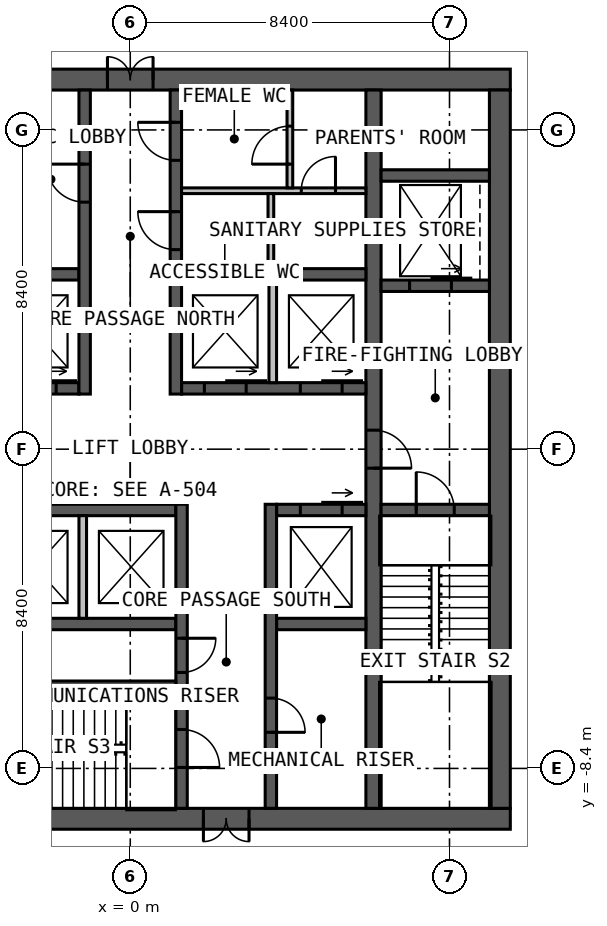
"""IFC4 building model, lengths in metres.
Left out: names, types, materials, properties, quantities, classifications, styles, units other than length and angle.
Written with IfcOpenShell. Run it as: python <this file> out.ifc"""

import sys

from ifc_helpers import new_model, si_unit, direction, frame, frame_2d, origin, place, context, subcontext, project, spatial, rectangle, extrude, element, fill, save


model = new_model("IFC4")
c1 = context("Model", 3, precision=1e-05, world=origin(), true_north=direction((0.0, 1.0)))
c2 = subcontext(c1, "Body", "Model", "MODEL_VIEW")
j1 = project(units=[si_unit("LENGTHUNIT", "METRE"), si_unit("PLANEANGLEUNIT", "RADIAN")], contexts=[c1])
p1 = place(None, origin())
s1 = spatial("IfcSite", under=j1, at=p1, CompositionType="ELEMENT")
p2 = place(p1, origin())
s2 = spatial("IfcBuilding", under=s1, at=p2, CompositionType="ELEMENT")
p3 = place(p2, frame((0.0, 0.0, 130.0)))
s3 = spatial("IfcBuildingStorey", under=s2, at=p3, CompositionType="ELEMENT", Elevation=130.0)
p4 = place(p3, frame((-10.0, 9.725, 0.0), z_axis=(0.0, 0.0, 1.0), x_axis=(1.0, 0.0, 0.0)))
e1 = element("IfcWall", 1, at=p4, inside=s3, PredefinedType="SOLIDWALL", context=c2, shape_type="SweptSolid", body=[
    extrude(rectangle(XDim=20.0, YDim=0.55, at=frame_2d((10.0, 0.0))), origin(), (0.0, 0.0, 1.0), 4.0),
])
p5 = place(p4, frame((9.4, 0.0, 0.0)))
e2 = element("IfcOpeningElement", 2, at=p5, cuts=e1, PredefinedType="OPENING", context=c2, shape_type="SweptSolid", body=[
    extrude(rectangle(XDim=1.2, YDim=2.2, at=frame_2d((0.6, 1.1))), frame((0.0, 0.285, 0.0), z_axis=(0.0, -1.0, 0.0), x_axis=(1.0, 0.0, 0.0)), (0.0, 0.0, 1.0), 0.57),
])
p6 = place(p3, frame((10.0, -9.725, 0.0), z_axis=(0.0, 0.0, 1.0), x_axis=(-1.0, 0.0, 0.0)))
e3 = element("IfcWall", 3, at=p6, inside=s3, PredefinedType="SOLIDWALL", context=c2, shape_type="SweptSolid", body=[
    extrude(rectangle(XDim=20.0, YDim=0.55, at=frame_2d((10.0, 0.0))), origin(), (0.0, 0.0, 1.0), 4.0),
])
p7 = place(p6, frame((6.875, 0.0, 0.0)))
e4 = element("IfcOpeningElement", 4, at=p7, cuts=e3, PredefinedType="OPENING", context=c2, shape_type="SweptSolid", body=[
    extrude(rectangle(XDim=1.2, YDim=2.2, at=frame_2d((0.6, 1.1))), frame((0.0, 0.285, 0.0), z_axis=(0.0, -1.0, 0.0), x_axis=(1.0, 0.0, 0.0)), (0.0, 0.0, 1.0), 0.57),
])
p8 = place(p3, frame((9.725, -9.45, 0.0), z_axis=(0.0, 0.0, 1.0), x_axis=(0.0, 1.0, 0.0)))
e5 = element("IfcWall", 5, at=p8, inside=s3, PredefinedType="SOLIDWALL", context=c2, shape_type="SweptSolid", body=[
    extrude(rectangle(XDim=18.9, YDim=0.55, at=frame_2d((9.45, 0.0))), origin(), (0.0, 0.0, 1.0), 4.0),
])
p9 = place(p3, frame((6.4, 9.45, 0.0), z_axis=(0.0, 0.0, 1.0), x_axis=(0.0, -1.0, 0.0)))
e6 = element("IfcWall", 6, at=p9, inside=s3, PredefinedType="SOLIDWALL", context=c2, shape_type="SweptSolid", body=[
    extrude(rectangle(XDim=18.9, YDim=0.4, at=frame_2d((9.45, 0.0))), origin(), (0.0, 0.0, 1.0), 4.0),
])
p10 = place(p9, frame((8.95, 0.0, 0.0)))
e7 = element("IfcOpeningElement", 7, at=p10, cuts=e6, PredefinedType="OPENING", context=c2, shape_type="SweptSolid", body=[
    extrude(rectangle(XDim=1.0, YDim=2.2, at=frame_2d((0.5, 1.1))), frame((0.0, 0.21, 0.0), z_axis=(0.0, -1.0, 0.0), x_axis=(1.0, 0.0, 0.0)), (0.0, 0.0, 1.0), 0.42),
])
p11 = place(p3, frame((-6.2, 1.6, 0.0), z_axis=(0.0, 0.0, 1.0), x_axis=(1.0, 0.0, 0.0)))
e8 = element("IfcWall", 8, at=p11, inside=s3, PredefinedType="SOLIDWALL", context=c2, shape_type="SweptSolid", body=[
    extrude(rectangle(XDim=4.85, YDim=0.3, at=frame_2d((2.425, 0.0))), origin(), (0.0, 0.0, 1.0), 4.0),
])
p12 = place(p11, frame((0.625, 0.0, 0.0)))
e9 = element("IfcOpeningElement", 9, at=p12, cuts=e8, PredefinedType="OPENING", context=c2, shape_type="SweptSolid", body=[
    extrude(rectangle(XDim=1.1, YDim=2.2, at=frame_2d((0.55, 1.1))), frame((0.0, 0.16, 0.0), z_axis=(0.0, -1.0, 0.0), x_axis=(1.0, 0.0, 0.0)), (0.0, 0.0, 1.0), 0.32),
])
p13 = place(p11, frame((3.15, 0.0, 0.0)))
e10 = element("IfcOpeningElement", 10, at=p13, cuts=e8, PredefinedType="OPENING", context=c2, shape_type="SweptSolid", body=[
    extrude(rectangle(XDim=1.1, YDim=2.2, at=frame_2d((0.55, 1.1))), frame((0.0, 0.16, 0.0), z_axis=(0.0, -1.0, 0.0), x_axis=(1.0, 0.0, 0.0)), (0.0, 0.0, 1.0), 0.32),
])
p14 = place(p3, frame((1.35, 1.6, 0.0), z_axis=(0.0, 0.0, 1.0), x_axis=(1.0, 0.0, 0.0)))
e11 = element("IfcWall", 11, at=p14, inside=s3, PredefinedType="SOLIDWALL", context=c2, shape_type="SweptSolid", body=[
    extrude(rectangle(XDim=4.85, YDim=0.3, at=frame_2d((2.425, 0.0))), origin(), (0.0, 0.0, 1.0), 4.0),
])
p15 = place(p14, frame((0.6, 0.0, 0.0)))
e12 = element("IfcOpeningElement", 12, at=p15, cuts=e11, PredefinedType="OPENING", context=c2, shape_type="SweptSolid", body=[
    extrude(rectangle(XDim=1.1, YDim=2.2, at=frame_2d((0.55, 1.1))), frame((0.0, 0.16, 0.0), z_axis=(0.0, -1.0, 0.0), x_axis=(1.0, 0.0, 0.0)), (0.0, 0.0, 1.0), 0.32),
])
p16 = place(p14, frame((3.125, 0.0, 0.0)))
e13 = element("IfcOpeningElement", 13, at=p16, cuts=e11, PredefinedType="OPENING", context=c2, shape_type="SweptSolid", body=[
    extrude(rectangle(XDim=1.1, YDim=2.2, at=frame_2d((0.55, 1.1))), frame((0.0, 0.16, 0.0), z_axis=(0.0, -1.0, 0.0), x_axis=(1.0, 0.0, 0.0)), (0.0, 0.0, 1.0), 0.32),
])
for number, where, z_axis, x_axis in (
    (14, (-6.2, 4.6, 0.0), (0.0, 0.0, 1.0), (1.0, 0.0, 0.0)),
    (15, (1.35, 4.6, 0.0), (0.0, 0.0, 1.0), (1.0, 0.0, 0.0)),
):
    element("IfcWall", number, at=place(p3, frame(where, z_axis=z_axis, x_axis=x_axis)), inside=s3, PredefinedType="SOLIDWALL", context=c2, shape_type="SweptSolid", body=[
        extrude(rectangle(XDim=4.85, YDim=0.3, at=frame_2d((2.425, 0.0))), origin(), (0.0, 0.0, 1.0), 4.0),
    ])
p17 = place(p3, frame((-1.2, 1.45, 0.0), z_axis=(0.0, 0.0, 1.0), x_axis=(0.0, 1.0, 0.0)))
e16 = element("IfcWall", 16, at=p17, inside=s3, PredefinedType="SOLIDWALL", context=c2, shape_type="SweptSolid", body=[
    extrude(rectangle(XDim=8.0, YDim=0.3, at=frame_2d((4.0, 0.0))), origin(), (0.0, 0.0, 1.0), 4.0),
])
p18 = place(p17, frame((5.05, 0.0, 0.0)))
e17 = element("IfcOpeningElement", 17, at=p18, cuts=e16, PredefinedType="OPENING", context=c2, shape_type="SweptSolid", body=[
    extrude(rectangle(XDim=1.0, YDim=2.2, at=frame_2d((0.5, 1.1))), frame((0.0, 0.16, 0.0), z_axis=(0.0, -1.0, 0.0), x_axis=(1.0, 0.0, 0.0)), (0.0, 0.0, 1.0), 0.32),
])
p19 = place(p3, frame((1.2, 1.45, 0.0), z_axis=(0.0, 0.0, 1.0), x_axis=(0.0, 1.0, 0.0)))
e18 = element("IfcWall", 18, at=p19, inside=s3, PredefinedType="SOLIDWALL", context=c2, shape_type="SweptSolid", body=[
    extrude(rectangle(XDim=8.0, YDim=0.3, at=frame_2d((4.0, 0.0))), origin(), (0.0, 0.0, 1.0), 4.0),
])
p20 = place(p19, frame((3.8, 0.0, 0.0)))
e19 = element("IfcOpeningElement", 19, at=p20, cuts=e18, PredefinedType="OPENING", context=c2, shape_type="SweptSolid", body=[
    extrude(rectangle(XDim=1.0, YDim=2.2, at=frame_2d((0.5, 1.1))), frame((0.0, 0.16, 0.0), z_axis=(0.0, -1.0, 0.0), x_axis=(1.0, 0.0, 0.0)), (0.0, 0.0, 1.0), 0.32),
])
p21 = place(p19, frame((6.15, 0.0, 0.0)))
e20 = element("IfcOpeningElement", 20, at=p21, cuts=e18, PredefinedType="OPENING", context=c2, shape_type="SweptSolid", body=[
    extrude(rectangle(XDim=1.0, YDim=2.2, at=frame_2d((0.5, 1.1))), frame((0.0, 0.16, 0.0), z_axis=(0.0, -1.0, 0.0), x_axis=(1.0, 0.0, 0.0)), (0.0, 0.0, 1.0), 0.32),
])
p22 = place(p3, frame((-6.2, -1.6, 0.0), z_axis=(0.0, 0.0, 1.0), x_axis=(1.0, 0.0, 0.0)))
e21 = element("IfcWall", 21, at=p22, inside=s3, PredefinedType="SOLIDWALL", context=c2, shape_type="SweptSolid", body=[
    extrude(rectangle(XDim=7.4, YDim=0.3, at=frame_2d((3.7, 0.0))), origin(), (0.0, 0.0, 1.0), 4.0),
])
p23 = place(p3, frame((3.85, -1.6, 0.0), z_axis=(0.0, 0.0, 1.0), x_axis=(1.0, 0.0, 0.0)))
e22 = element("IfcWall", 22, at=p23, inside=s3, PredefinedType="SOLIDWALL", context=c2, shape_type="SweptSolid", body=[
    extrude(rectangle(XDim=2.35, YDim=0.3, at=frame_2d((1.175, 0.0))), origin(), (0.0, 0.0, 1.0), 4.0),
])
p24 = place(p23, frame((0.625, 0.0, 0.0)))
e23 = element("IfcOpeningElement", 23, at=p24, cuts=e22, PredefinedType="OPENING", context=c2, shape_type="SweptSolid", body=[
    extrude(rectangle(XDim=1.1, YDim=2.2, at=frame_2d((0.55, 1.1))), frame((0.0, 0.16, 0.0), z_axis=(0.0, -1.0, 0.0), x_axis=(1.0, 0.0, 0.0)), (0.0, 0.0, 1.0), 0.32),
])
p25 = place(p3, frame((-6.2, -4.6, 0.0), z_axis=(0.0, 0.0, 1.0), x_axis=(1.0, 0.0, 0.0)))
e24 = element("IfcWall", 24, at=p25, inside=s3, PredefinedType="SOLIDWALL", context=c2, shape_type="SweptSolid", body=[
    extrude(rectangle(XDim=7.4, YDim=0.3, at=frame_2d((3.7, 0.0))), origin(), (0.0, 0.0, 1.0), 4.0),
])
p26 = place(p3, frame((3.85, -4.6, 0.0), z_axis=(0.0, 0.0, 1.0), x_axis=(1.0, 0.0, 0.0)))
e25 = element("IfcWall", 25, at=p26, inside=s3, PredefinedType="SOLIDWALL", context=c2, shape_type="SweptSolid", body=[
    extrude(rectangle(XDim=2.35, YDim=0.3, at=frame_2d((1.175, 0.0))), origin(), (0.0, 0.0, 1.0), 4.0),
])
p27 = place(p3, frame((1.35, -1.45, 0.0), z_axis=(0.0, 0.0, 1.0), x_axis=(0.0, -1.0, 0.0)))
e26 = element("IfcWall", 26, at=p27, inside=s3, PredefinedType="SOLIDWALL", context=c2, shape_type="SweptSolid", body=[
    extrude(rectangle(XDim=8.0, YDim=0.3, at=frame_2d((4.0, 0.0))), origin(), (0.0, 0.0, 1.0), 4.0),
])
p28 = place(p27, frame((5.925, 0.0, 0.0)))
e27 = element("IfcOpeningElement", 27, at=p28, cuts=e26, PredefinedType="OPENING", context=c2, shape_type="SweptSolid", body=[
    extrude(rectangle(XDim=1.0, YDim=2.2, at=frame_2d((0.5, 1.1))), frame((0.0, 0.16, 0.0), z_axis=(0.0, -1.0, 0.0), x_axis=(1.0, 0.0, 0.0)), (0.0, 0.0, 1.0), 0.32),
])
p29 = place(p27, frame((3.525, 0.0, 0.0)))
e28 = element("IfcOpeningElement", 28, at=p29, cuts=e26, PredefinedType="OPENING", context=c2, shape_type="SweptSolid", body=[
    extrude(rectangle(XDim=0.9, YDim=2.2, at=frame_2d((0.45, 1.1))), frame((0.0, 0.16, 0.0), z_axis=(0.0, -1.0, 0.0), x_axis=(1.0, 0.0, 0.0)), (0.0, 0.0, 1.0), 0.32),
])
p30 = place(p3, frame((3.7, -1.45, 0.0), z_axis=(0.0, 0.0, 1.0), x_axis=(0.0, -1.0, 0.0)))
e29 = element("IfcWall", 29, at=p30, inside=s3, PredefinedType="SOLIDWALL", context=c2, shape_type="SweptSolid", body=[
    extrude(rectangle(XDim=8.0, YDim=0.3, at=frame_2d((4.0, 0.0))), origin(), (0.0, 0.0, 1.0), 4.0),
])
p31 = place(p30, frame((5.1, 0.0, 0.0)))
e30 = element("IfcOpeningElement", 30, at=p31, cuts=e29, PredefinedType="OPENING", context=c2, shape_type="SweptSolid", body=[
    extrude(rectangle(XDim=0.9, YDim=2.2, at=frame_2d((0.45, 1.1))), frame((0.0, 0.16, 0.0), z_axis=(0.0, -1.0, 0.0), x_axis=(1.0, 0.0, 0.0)), (0.0, 0.0, 1.0), 0.32),
])
p32 = place(p3, frame((-6.2, -6.2, 0.0), z_axis=(0.0, 0.0, 1.0), x_axis=(1.0, 0.0, 0.0)))
e31 = element("IfcWall", 31, at=p32, inside=s3, PredefinedType="SOLIDWALL", context=c2, shape_type="SweptSolid", body=[
    extrude(rectangle(XDim=7.4, YDim=0.2, at=frame_2d((3.7, 0.0))), origin(), (0.0, 0.0, 1.0), 4.0),
])
p33 = place(p3, frame((6.6, -1.6, 0.0), z_axis=(0.0, 0.0, 1.0), x_axis=(1.0, 0.0, 0.0)))
e32 = element("IfcWall", 32, at=p33, inside=s3, PredefinedType="SOLIDWALL", context=c2, shape_type="SweptSolid", body=[
    extrude(rectangle(XDim=2.85, YDim=0.3, at=frame_2d((1.425, 0.0))), origin(), (0.0, 0.0, 1.0), 4.0),
])
p34 = place(p33, frame((0.925, 0.0, 0.0)))
e33 = element("IfcOpeningElement", 33, at=p34, cuts=e32, PredefinedType="OPENING", context=c2, shape_type="SweptSolid", body=[
    extrude(rectangle(XDim=1.0, YDim=2.2, at=frame_2d((0.5, 1.1))), frame((0.0, 0.16, 0.0), z_axis=(0.0, -1.0, 0.0), x_axis=(1.0, 0.0, 0.0)), (0.0, 0.0, 1.0), 0.32),
])
p35 = place(p3, frame((6.6, 4.3, 0.0), z_axis=(0.0, 0.0, 1.0), x_axis=(1.0, 0.0, 0.0)))
e34 = element("IfcWall", 34, at=p35, inside=s3, PredefinedType="SOLIDWALL", context=c2, shape_type="SweptSolid", body=[
    extrude(rectangle(XDim=2.85, YDim=0.3, at=frame_2d((1.425, 0.0))), origin(), (0.0, 0.0, 1.0), 4.0),
])
p36 = place(p35, frame((0.75, 0.0, 0.0)))
e35 = element("IfcOpeningElement", 35, at=p36, cuts=e34, PredefinedType="OPENING", context=c2, shape_type="SweptSolid", body=[
    extrude(rectangle(XDim=1.1, YDim=2.2, at=frame_2d((0.55, 1.1))), frame((0.0, 0.16, 0.0), z_axis=(0.0, -1.0, 0.0), x_axis=(1.0, 0.0, 0.0)), (0.0, 0.0, 1.0), 0.32),
])
p37 = place(p3, frame((6.6, 7.2, 0.0), z_axis=(0.0, 0.0, 1.0), x_axis=(1.0, 0.0, 0.0)))
e36 = element("IfcWall", 36, at=p37, inside=s3, PredefinedType="SOLIDWALL", context=c2, shape_type="SweptSolid", body=[
    extrude(rectangle(XDim=2.85, YDim=0.3, at=frame_2d((1.425, 0.0))), origin(), (0.0, 0.0, 1.0), 4.0),
])
for number, where, z_axis, x_axis in (
    (37, (3.75, 1.75, 0.0), (0.0, 0.0, 1.0), (0.0, 1.0, 0.0)),
    (38, (-1.25, -1.75, 0.0), (0.0, 0.0, 1.0), (0.0, -1.0, 0.0)),
):
    element("IfcWall", number, at=place(p3, frame(where, z_axis=z_axis, x_axis=x_axis)), inside=s3, PredefinedType="SOLIDWALL", context=c2, shape_type="SweptSolid", body=[
        extrude(rectangle(XDim=2.7, YDim=0.2, at=frame_2d((1.35, 0.0))), origin(), (0.0, 0.0, 1.0), 3.75),
    ])
p38 = place(p3, frame((1.35, 6.8, 0.0), z_axis=(0.0, 0.0, 1.0), x_axis=(1.0, 0.0, 0.0)))
e39 = element("IfcWall", 39, at=p38, inside=s3, PredefinedType="PARTITIONING", context=c2, shape_type="SweptSolid", body=[
    extrude(rectangle(XDim=4.85, YDim=0.15, at=frame_2d((2.425, 0.0))), origin(), (0.0, 0.0, 1.0), 3.75),
])
p39 = place(p38, frame((3.15, 0.0, 0.0)))
e40 = element("IfcOpeningElement", 40, at=p39, cuts=e39, PredefinedType="OPENING", context=c2, shape_type="SweptSolid", body=[
    extrude(rectangle(XDim=0.9, YDim=2.2, at=frame_2d((0.45, 1.1))), frame((0.0, 0.085, 0.0), z_axis=(0.0, -1.0, 0.0), x_axis=(1.0, 0.0, 0.0)), (0.0, 0.0, 1.0), 0.17),
])
p40 = place(p3, frame((3.7, 4.75, 0.0), z_axis=(0.0, 0.0, 1.0), x_axis=(0.0, 1.0, 0.0)))
e41 = element("IfcWall", 41, at=p40, inside=s3, PredefinedType="PARTITIONING", context=c2, shape_type="SweptSolid", body=[
    extrude(rectangle(XDim=1.975, YDim=0.15, at=frame_2d((0.988, 0.0))), origin(), (0.0, 0.0, 1.0), 3.75),
])
p41 = place(p3, frame((4.2, 6.875, 0.0), z_axis=(0.0, 0.0, 1.0), x_axis=(0.0, 1.0, 0.0)))
e42 = element("IfcWall", 42, at=p41, inside=s3, PredefinedType="PARTITIONING", context=c2, shape_type="SweptSolid", body=[
    extrude(rectangle(XDim=2.575, YDim=0.15, at=frame_2d((1.288, 0.0))), origin(), (0.0, 0.0, 1.0), 3.75),
])
p42 = place(p41, frame((0.625, 0.0, 0.0)))
e43 = element("IfcOpeningElement", 43, at=p42, cuts=e42, PredefinedType="OPENING", context=c2, shape_type="SweptSolid", body=[
    extrude(rectangle(XDim=1.0, YDim=2.2, at=frame_2d((0.5, 1.1))), frame((0.0, 0.085, 0.0), z_axis=(0.0, -1.0, 0.0), x_axis=(1.0, 0.0, 0.0)), (0.0, 0.0, 1.0), 0.17),
])
p43 = place(p5, origin())
e44 = element("IfcDoor", 44, at=p43, inside=s3, OperationType="DOUBLE_DOOR_SINGLE_SWING", PredefinedType="DOOR", context=c2, shape_type="SweptSolid", body=[
    extrude(rectangle(XDim=1.2, YDim=2.2, at=frame_2d((0.6, 1.1))), frame((0.0, 0.025, 0.0), z_axis=(0.0, -1.0, 0.0), x_axis=(1.0, 0.0, 0.0)), (0.0, 0.0, 1.0), 0.05),
])
fill(e2, e44)
p44 = place(p7, origin())
e45 = element("IfcDoor", 45, at=p44, inside=s3, OperationType="DOUBLE_DOOR_SINGLE_SWING", PredefinedType="DOOR", context=c2, shape_type="SweptSolid", body=[
    extrude(rectangle(XDim=1.2, YDim=2.2, at=frame_2d((0.6, 1.1))), frame((0.0, 0.025, 0.0), z_axis=(0.0, -1.0, 0.0), x_axis=(1.0, 0.0, 0.0)), (0.0, 0.0, 1.0), 0.05),
])
fill(e4, e45)
p45 = place(p10, origin())
e46 = element("IfcDoor", 46, at=p45, inside=s3, OperationType="SINGLE_SWING_RIGHT", PredefinedType="DOOR", context=c2, shape_type="SweptSolid", body=[
    extrude(rectangle(XDim=1.0, YDim=2.2, at=frame_2d((0.5, 1.1))), frame((0.0, 0.025, 0.0), z_axis=(0.0, -1.0, 0.0), x_axis=(1.0, 0.0, 0.0)), (0.0, 0.0, 1.0), 0.05),
])
fill(e7, e46)
p46 = place(p34, origin())
e47 = element("IfcDoor", 47, at=p46, inside=s3, OperationType="SINGLE_SWING_LEFT", PredefinedType="DOOR", context=c2, shape_type="SweptSolid", body=[
    extrude(rectangle(XDim=1.0, YDim=2.2, at=frame_2d((0.5, 1.1))), frame((0.0, 0.025, 0.0), z_axis=(0.0, -1.0, 0.0), x_axis=(1.0, 0.0, 0.0)), (0.0, 0.0, 1.0), 0.05),
])
fill(e33, e47)
p47 = place(p28, origin())
e48 = element("IfcDoor", 48, at=p47, inside=s3, OperationType="SINGLE_SWING_RIGHT", PredefinedType="DOOR", context=c2, shape_type="SweptSolid", body=[
    extrude(rectangle(XDim=1.0, YDim=2.2, at=frame_2d((0.5, 1.1))), frame((0.0, 0.025, 0.0), z_axis=(0.0, -1.0, 0.0), x_axis=(1.0, 0.0, 0.0)), (0.0, 0.0, 1.0), 0.05),
])
fill(e27, e48)
p48 = place(p18, origin())
e49 = element("IfcDoor", 49, at=p48, inside=s3, OperationType="SINGLE_SWING_RIGHT", PredefinedType="DOOR", context=c2, shape_type="SweptSolid", body=[
    extrude(rectangle(XDim=1.0, YDim=2.2, at=frame_2d((0.5, 1.1))), frame((0.0, 0.025, 0.0), z_axis=(0.0, -1.0, 0.0), x_axis=(1.0, 0.0, 0.0)), (0.0, 0.0, 1.0), 0.05),
])
fill(e17, e49)
p49 = place(p20, origin())
e50 = element("IfcDoor", 50, at=p49, inside=s3, OperationType="SINGLE_SWING_RIGHT", PredefinedType="DOOR", context=c2, shape_type="SweptSolid", body=[
    extrude(rectangle(XDim=1.0, YDim=2.2, at=frame_2d((0.5, 1.1))), frame((0.0, 0.025, 0.0), z_axis=(0.0, -1.0, 0.0), x_axis=(1.0, 0.0, 0.0)), (0.0, 0.0, 1.0), 0.05),
])
fill(e19, e50)
p50 = place(p21, origin())
e51 = element("IfcDoor", 51, at=p50, inside=s3, OperationType="SINGLE_SWING_RIGHT", PredefinedType="DOOR", context=c2, shape_type="SweptSolid", body=[
    extrude(rectangle(XDim=1.0, YDim=2.2, at=frame_2d((0.5, 1.1))), frame((0.0, 0.025, 0.0), z_axis=(0.0, -1.0, 0.0), x_axis=(1.0, 0.0, 0.0)), (0.0, 0.0, 1.0), 0.05),
])
fill(e20, e51)
p51 = place(p29, origin())
e52 = element("IfcDoor", 52, at=p51, inside=s3, OperationType="SINGLE_SWING_LEFT", PredefinedType="DOOR", context=c2, shape_type="SweptSolid", body=[
    extrude(rectangle(XDim=0.9, YDim=2.2, at=frame_2d((0.45, 1.1))), frame((0.0, 0.025, 0.0), z_axis=(0.0, -1.0, 0.0), x_axis=(1.0, 0.0, 0.0)), (0.0, 0.0, 1.0), 0.05),
])
fill(e28, e52)
p52 = place(p31, origin())
e53 = element("IfcDoor", 53, at=p52, inside=s3, OperationType="SINGLE_SWING_RIGHT", PredefinedType="DOOR", context=c2, shape_type="SweptSolid", body=[
    extrude(rectangle(XDim=0.9, YDim=2.2, at=frame_2d((0.45, 1.1))), frame((0.0, 0.025, 0.0), z_axis=(0.0, -1.0, 0.0), x_axis=(1.0, 0.0, 0.0)), (0.0, 0.0, 1.0), 0.05),
])
fill(e30, e53)
p53 = place(p39, origin())
e54 = element("IfcDoor", 54, at=p53, inside=s3, OperationType="SINGLE_SWING_RIGHT", PredefinedType="DOOR", context=c2, shape_type="SweptSolid", body=[
    extrude(rectangle(XDim=0.9, YDim=2.2, at=frame_2d((0.45, 1.1))), frame((0.0, 0.025, 0.0), z_axis=(0.0, -1.0, 0.0), x_axis=(1.0, 0.0, 0.0)), (0.0, 0.0, 1.0), 0.05),
])
fill(e40, e54)
p54 = place(p42, origin())
e55 = element("IfcDoor", 55, at=p54, inside=s3, OperationType="SINGLE_SWING_LEFT", PredefinedType="DOOR", context=c2, shape_type="SweptSolid", body=[
    extrude(rectangle(XDim=1.0, YDim=2.2, at=frame_2d((0.5, 1.1))), frame((0.0, 0.025, 0.0), z_axis=(0.0, -1.0, 0.0), x_axis=(1.0, 0.0, 0.0)), (0.0, 0.0, 1.0), 0.05),
])
fill(e43, e55)
p55 = place(p13, origin())
e56 = element("IfcDoor", 56, at=p55, inside=s3, OperationType="SLIDING_TO_LEFT", PredefinedType="DOOR", context=c2, shape_type="SweptSolid", body=[
    extrude(rectangle(XDim=1.1, YDim=2.2, at=frame_2d((0.55, 1.1))), frame((0.0, 0.025, 0.0), z_axis=(0.0, -1.0, 0.0), x_axis=(1.0, 0.0, 0.0)), (0.0, 0.0, 1.0), 0.05),
])
fill(e10, e56)
p56 = place(p15, origin())
e57 = element("IfcDoor", 57, at=p56, inside=s3, OperationType="SLIDING_TO_LEFT", PredefinedType="DOOR", context=c2, shape_type="SweptSolid", body=[
    extrude(rectangle(XDim=1.1, YDim=2.2, at=frame_2d((0.55, 1.1))), frame((0.0, 0.025, 0.0), z_axis=(0.0, -1.0, 0.0), x_axis=(1.0, 0.0, 0.0)), (0.0, 0.0, 1.0), 0.05),
])
fill(e12, e57)
p57 = place(p16, origin())
e58 = element("IfcDoor", 58, at=p57, inside=s3, OperationType="SLIDING_TO_LEFT", PredefinedType="DOOR", context=c2, shape_type="SweptSolid", body=[
    extrude(rectangle(XDim=1.1, YDim=2.2, at=frame_2d((0.55, 1.1))), frame((0.0, 0.025, 0.0), z_axis=(0.0, -1.0, 0.0), x_axis=(1.0, 0.0, 0.0)), (0.0, 0.0, 1.0), 0.05),
])
fill(e13, e58)
p58 = place(p24, origin())
e59 = element("IfcDoor", 59, at=p58, inside=s3, OperationType="SLIDING_TO_LEFT", PredefinedType="DOOR", context=c2, shape_type="SweptSolid", body=[
    extrude(rectangle(XDim=1.1, YDim=2.2, at=frame_2d((0.55, 1.1))), frame((0.0, 0.025, 0.0), z_axis=(0.0, -1.0, 0.0), x_axis=(1.0, 0.0, 0.0)), (0.0, 0.0, 1.0), 0.05),
])
fill(e23, e59)
p59 = place(p36, origin())
e60 = element("IfcDoor", 60, at=p59, inside=s3, OperationType="SLIDING_TO_LEFT", PredefinedType="DOOR", context=c2, shape_type="SweptSolid", body=[
    extrude(rectangle(XDim=1.1, YDim=2.2, at=frame_2d((0.55, 1.1))), frame((0.0, 0.025, 0.0), z_axis=(0.0, -1.0, 0.0), x_axis=(1.0, 0.0, 0.0)), (0.0, 0.0, 1.0), 0.05),
])
fill(e35, e60)
save(model, sys.argv[1])
